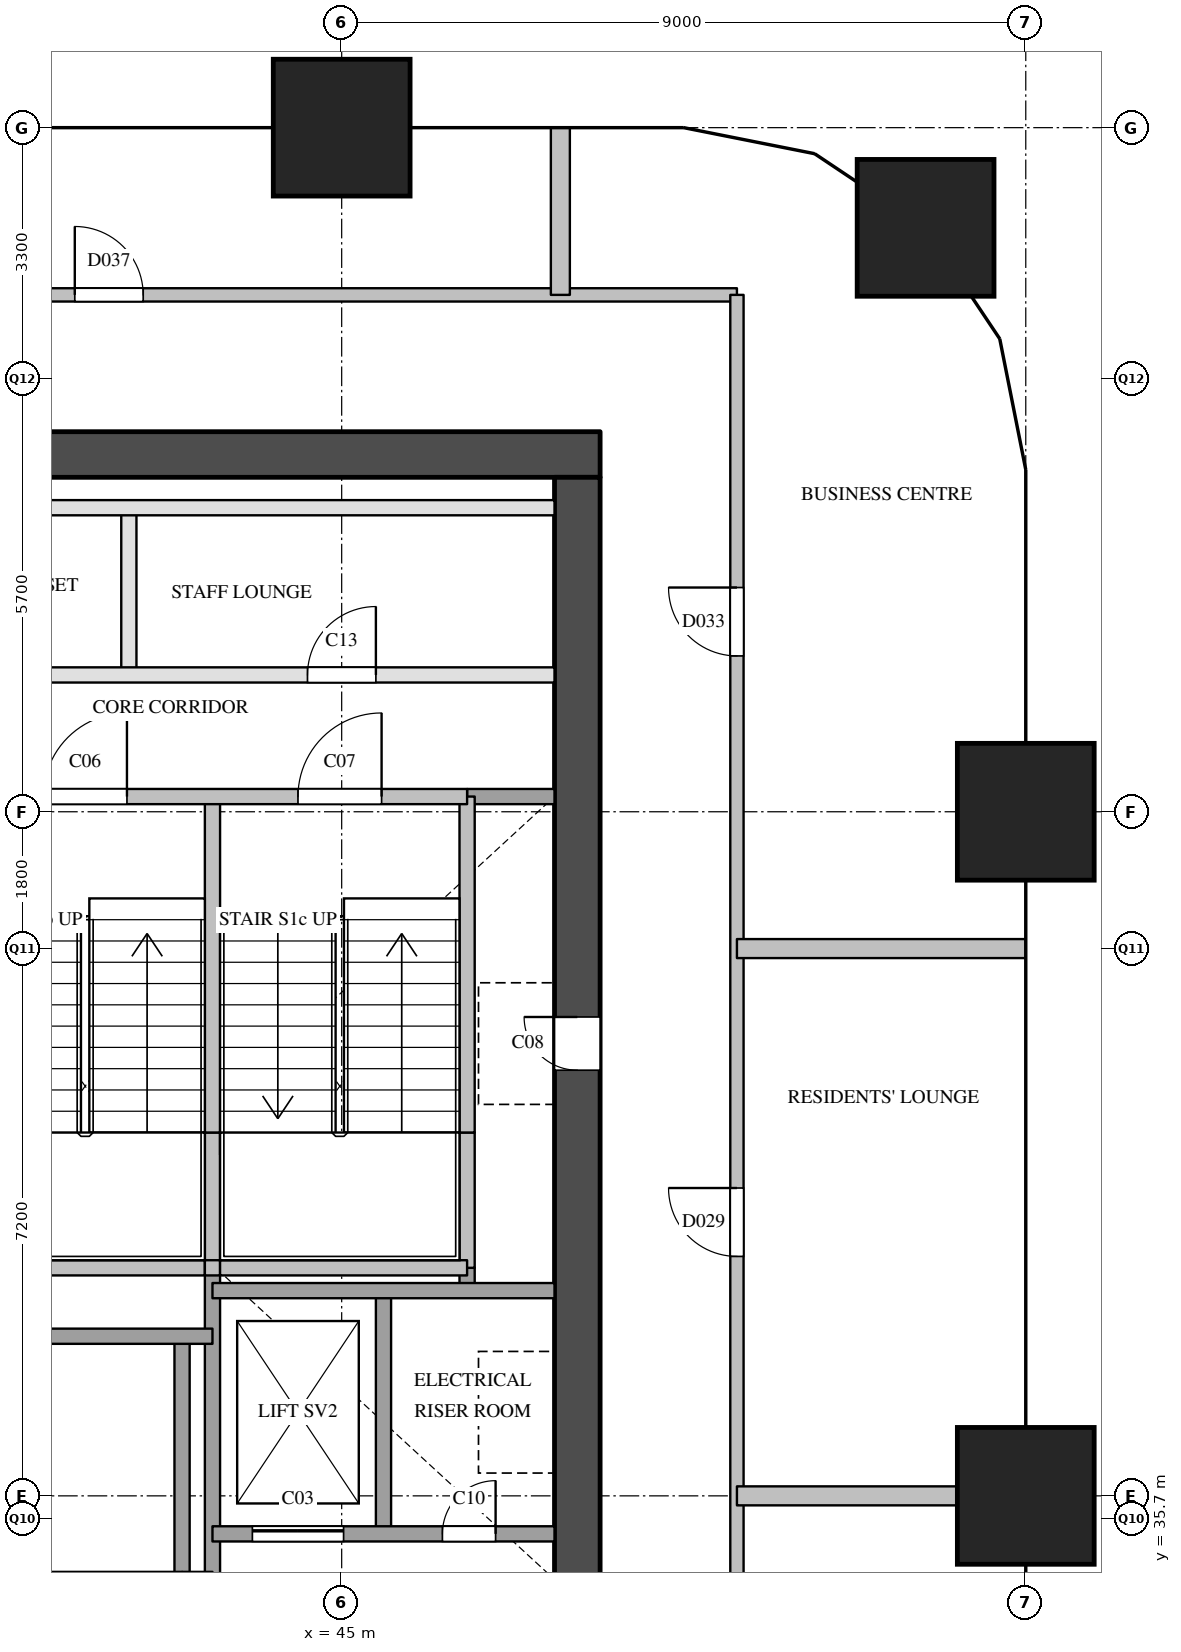
"""IFC4 building model, lengths in metres.
Left out: names, types, materials, properties, quantities, classifications, styles, units other than length and angle.
Written with IfcOpenShell. Run it as: python <this file> out.ifc"""

import sys

from ifc_helpers import new_model, si_unit, direction, frame, frame_2d, origin, origin_2d, place, context, subcontext, project, spatial, rectangle, extrude, element, fill, save


model = new_model("IFC4")
c1 = context("Model", 3, precision=1e-05, world=origin(), true_north=direction((0.0, 1.0)))
c2 = subcontext(c1, "Body", "Model", "MODEL_VIEW")
j1 = project(units=[si_unit("LENGTHUNIT", "METRE"), si_unit("PLANEANGLEUNIT", "RADIAN")], contexts=[c1])
p1 = place(None, origin())
s1 = spatial("IfcSite", under=j1, at=p1, CompositionType="ELEMENT")
p2 = place(p1, origin())
s2 = spatial("IfcBuilding", under=s1, at=p2, CompositionType="ELEMENT")
p3 = place(p2, frame((0.0, 0.0, 112.0)))
s3 = spatial("IfcBuildingStorey", under=s2, at=p3, CompositionType="ELEMENT", Elevation=112.0)
for number, where, z_axis, x_axis in (
    (1, (45.0, 54.0, 0.0), (0.0, 0.0, 1.0), (1.0, 0.0, 0.0)),
    (2, (54.0, 36.0, 0.0), (0.0, 0.0, 1.0), (1.0, 0.0, 0.0)),
    (3, (54.0, 45.0, 0.0), (0.0, 0.0, 1.0), (1.0, 0.0, 0.0)),
    (4, (52.682, 52.682, 0.0), (0.0, 0.0, 1.0), (1.0, 0.0, 0.0)),
):
    element("IfcColumn", number, at=place(p3, frame(where, z_axis=z_axis, x_axis=x_axis)), inside=s3, PredefinedType="COLUMN", context=c2, shape_type="SweptSolid", body=[
        extrude(rectangle(XDim=1.8, YDim=1.8, at=origin_2d()), origin(), (0.0, 0.0, 1.0), 3.8),
    ])
p4 = place(p3, frame((36.0, 49.7, 0.0), z_axis=(0.0, 0.0, 1.0), x_axis=(1.0, 0.0, 0.0)))
e5 = element("IfcWall", 5, at=p4, inside=s3, PredefinedType="SHEAR", context=c2, shape_type="SweptSolid", body=[
    extrude(rectangle(XDim=12.4, YDim=0.6, at=frame_2d((6.2, 0.0))), origin(), (0.0, 0.0, 1.0), 3.5),
])
p5 = place(p3, frame((48.1, 29.1, 0.0), z_axis=(0.0, 0.0, 1.0), x_axis=(0.0, 1.0, 0.0)))
e6 = element("IfcWall", 6, at=p5, inside=s3, PredefinedType="SHEAR", context=c2, shape_type="SweptSolid", body=[
    extrude(rectangle(XDim=20.3, YDim=0.6, at=frame_2d((10.15, 0.0))), origin(), (0.0, 0.0, 1.0), 3.5),
])
p6 = place(p5, frame((12.5, 0.0, 0.0)))
e7 = element("IfcOpeningElement", 7, at=p6, cuts=e6, PredefinedType="OPENING", context=c2, shape_type="SweptSolid", body=[
    extrude(rectangle(XDim=0.7, YDim=2.1, at=frame_2d((0.35, 1.05))), frame((0.0, 0.31, 0.0), z_axis=(0.0, -1.0, 0.0), x_axis=(1.0, 0.0, 0.0)), (0.0, 0.0, 1.0), 0.62),
])
p7 = place(p5, frame((3.9, 0.0, 0.0)))
e8 = element("IfcOpeningElement", 8, at=p7, cuts=e6, PredefinedType="OPENING", context=c2, shape_type="SweptSolid", body=[
    extrude(rectangle(XDim=1.8, YDim=2.1, at=frame_2d((0.9, 1.05))), frame((0.0, 0.31, 0.0), z_axis=(0.0, -1.0, 0.0), x_axis=(1.0, 0.0, 0.0)), (0.0, 0.0, 1.0), 0.62),
])
p8 = place(p3, frame((42.2, 46.8, 0.0), z_axis=(0.0, 0.0, 1.0), x_axis=(0.0, 1.0, 0.0)))
e9 = element("IfcWall", 9, at=p8, inside=s3, PredefinedType="PARTITIONING", context=c2, shape_type="SweptSolid", body=[
    extrude(rectangle(XDim=2.2, YDim=0.2, at=frame_2d((1.1, 0.0))), origin(), (0.0, 0.0, 1.0), 3.5),
])
p9 = place(p3, frame((42.9, 34.9, 0.0), z_axis=(0.0, 0.0, 1.0), x_axis=(0.0, 1.0, 0.0)))
e10 = element("IfcWall", 10, at=p9, inside=s3, PredefinedType="SOLIDWALL", context=c2, shape_type="SweptSolid", body=[
    extrude(rectangle(XDim=3.2, YDim=0.2, at=frame_2d((1.6, 0.0))), origin(), (0.0, 0.0, 1.0), 3.5),
])
p10 = place(p3, frame((43.3, 29.1, 0.0), z_axis=(0.0, 0.0, 1.0), x_axis=(0.0, 1.0, 0.0)))
e11 = element("IfcWall", 11, at=p10, inside=s3, PredefinedType="SOLIDWALL", context=c2, shape_type="SweptSolid", body=[
    extrude(rectangle(XDim=9.9, YDim=0.2, at=frame_2d((4.95, 0.0))), origin(), (0.0, 0.0, 1.0), 3.5),
])
p11 = place(p3, frame((43.3, 39.0, 0.0), z_axis=(0.0, 0.0, 1.0), x_axis=(0.0, 1.0, 0.0)))
e12 = element("IfcWall", 12, at=p11, inside=s3, PredefinedType="SOLIDWALL", context=c2, shape_type="SweptSolid", body=[
    extrude(rectangle(XDim=1.78, YDim=0.2, at=frame_2d((0.89, 0.0))), origin(), (0.0, 0.0, 1.0), 3.5),
])
p12 = place(p3, frame((43.3, 40.78, 0.0), z_axis=(0.0, 0.0, 1.0), x_axis=(0.0, 1.0, 0.0)))
e13 = element("IfcWall", 13, at=p12, inside=s3, PredefinedType="SOLIDWALL", context=c2, shape_type="SweptSolid", body=[
    extrude(rectangle(XDim=4.42, YDim=0.2, at=frame_2d((2.21, 0.0))), origin(), (0.0, 0.0, 1.0), 3.5),
])
p13 = place(p3, frame((45.55, 35.5, 0.0), z_axis=(0.0, 0.0, 1.0), x_axis=(0.0, 1.0, 0.0)))
e14 = element("IfcWall", 14, at=p13, inside=s3, PredefinedType="SOLIDWALL", context=c2, shape_type="SweptSolid", body=[
    extrude(rectangle(XDim=3.2, YDim=0.2, at=frame_2d((1.6, 0.0))), origin(), (0.0, 0.0, 1.0), 3.5),
])
p14 = place(p3, frame((46.65, 38.7, 0.0), z_axis=(0.0, 0.0, 1.0), x_axis=(0.0, 1.0, 0.0)))
e15 = element("IfcWall", 15, at=p14, inside=s3, PredefinedType="SOLIDWALL", context=c2, shape_type="SweptSolid", body=[
    extrude(rectangle(XDim=0.3, YDim=0.2, at=frame_2d((0.15, 0.0))), origin(), (0.0, 0.0, 1.0), 3.5),
])
p15 = place(p3, frame((46.65, 39.0, 0.0), z_axis=(0.0, 0.0, 1.0), x_axis=(0.0, 1.0, 0.0)))
e16 = element("IfcWall", 16, at=p15, inside=s3, PredefinedType="SOLIDWALL", context=c2, shape_type="SweptSolid", body=[
    extrude(rectangle(XDim=1.78, YDim=0.2, at=frame_2d((0.89, 0.0))), origin(), (0.0, 0.0, 1.0), 3.5),
])
p16 = place(p3, frame((46.65, 40.78, 0.0), z_axis=(0.0, 0.0, 1.0), x_axis=(0.0, 1.0, 0.0)))
e17 = element("IfcWall", 17, at=p16, inside=s3, PredefinedType="SOLIDWALL", context=c2, shape_type="SweptSolid", body=[
    extrude(rectangle(XDim=4.42, YDim=0.2, at=frame_2d((2.21, 0.0))), origin(), (0.0, 0.0, 1.0), 3.5),
])
p17 = place(p3, frame((43.3, 35.5, 0.0), z_axis=(0.0, 0.0, 1.0), x_axis=(1.0, 0.0, 0.0)))
e18 = element("IfcWall", 18, at=p17, inside=s3, PredefinedType="SOLIDWALL", context=c2, shape_type="SweptSolid", body=[
    extrude(rectangle(XDim=4.5, YDim=0.2, at=frame_2d((2.25, 0.0))), origin(), (0.0, 0.0, 1.0), 3.5),
])
p18 = place(p17, frame((0.525, 0.0, 0.0)))
e19 = element("IfcOpeningElement", 19, at=p18, cuts=e18, PredefinedType="OPENING", context=c2, shape_type="SweptSolid", body=[
    extrude(rectangle(XDim=1.2, YDim=2.1, at=frame_2d((0.6, 1.05))), frame((0.0, 0.11, 0.0), z_axis=(0.0, -1.0, 0.0), x_axis=(1.0, 0.0, 0.0)), (0.0, 0.0, 1.0), 0.22),
])
p19 = place(p17, frame((3.025, 0.0, 0.0)))
e20 = element("IfcOpeningElement", 20, at=p19, cuts=e18, PredefinedType="OPENING", context=c2, shape_type="SweptSolid", body=[
    extrude(rectangle(XDim=0.7, YDim=2.1, at=frame_2d((0.35, 1.05))), frame((0.0, 0.11, 0.0), z_axis=(0.0, -1.0, 0.0), x_axis=(1.0, 0.0, 0.0)), (0.0, 0.0, 1.0), 0.22),
])
p20 = place(p3, frame((36.6, 38.1, 0.0), z_axis=(0.0, 0.0, 1.0), x_axis=(1.0, 0.0, 0.0)))
e21 = element("IfcWall", 21, at=p20, inside=s3, PredefinedType="SOLIDWALL", context=c2, shape_type="SweptSolid", body=[
    extrude(rectangle(XDim=6.7, YDim=0.2, at=frame_2d((3.35, 0.0))), origin(), (0.0, 0.0, 1.0), 3.5),
])
p21 = place(p3, frame((43.3, 38.7, 0.0), z_axis=(0.0, 0.0, 1.0), x_axis=(1.0, 0.0, 0.0)))
e22 = element("IfcWall", 22, at=p21, inside=s3, PredefinedType="SOLIDWALL", context=c2, shape_type="SweptSolid", body=[
    extrude(rectangle(XDim=4.5, YDim=0.2, at=frame_2d((2.25, 0.0))), origin(), (0.0, 0.0, 1.0), 3.5),
])
p22 = place(p3, frame((40.05, 39.0, 0.0), z_axis=(0.0, 0.0, 1.0), x_axis=(1.0, 0.0, 0.0)))
e23 = element("IfcWall", 23, at=p22, inside=s3, PredefinedType="SOLIDWALL", context=c2, shape_type="SweptSolid", body=[
    extrude(rectangle(XDim=3.15, YDim=0.2, at=frame_2d((1.575, 0.0))), origin(), (0.0, 0.0, 1.0), 3.5),
])
p23 = place(p3, frame((43.2, 39.0, 0.0), z_axis=(0.0, 0.0, 1.0), x_axis=(1.0, 0.0, 0.0)))
e24 = element("IfcWall", 24, at=p23, inside=s3, PredefinedType="SOLIDWALL", context=c2, shape_type="SweptSolid", body=[
    extrude(rectangle(XDim=0.2, YDim=0.2, at=frame_2d((0.1, 0.0))), origin(), (0.0, 0.0, 1.0), 3.5),
])
p24 = place(p3, frame((43.4, 39.0, 0.0), z_axis=(0.0, 0.0, 1.0), x_axis=(1.0, 0.0, 0.0)))
e25 = element("IfcWall", 25, at=p24, inside=s3, PredefinedType="SOLIDWALL", context=c2, shape_type="SweptSolid", body=[
    extrude(rectangle(XDim=3.25, YDim=0.2, at=frame_2d((1.625, 0.0))), origin(), (0.0, 0.0, 1.0), 3.5),
])
p25 = place(p3, frame((46.65, 45.2, 0.0), z_axis=(0.0, 0.0, 1.0), x_axis=(1.0, 0.0, 0.0)))
e26 = element("IfcWall", 26, at=p25, inside=s3, PredefinedType="SOLIDWALL", context=c2, shape_type="SweptSolid", body=[
    extrude(rectangle(XDim=1.15, YDim=0.2, at=frame_2d((0.575, 0.0))), origin(), (0.0, 0.0, 1.0), 3.5),
])
p26 = place(p3, frame((36.6, 45.2, 0.0), z_axis=(0.0, 0.0, 1.0), x_axis=(1.0, 0.0, 0.0)))
e27 = element("IfcWall", 27, at=p26, inside=s3, PredefinedType="SOLIDWALL", context=c2, shape_type="SweptSolid", body=[
    extrude(rectangle(XDim=10.05, YDim=0.2, at=frame_2d((5.025, 0.0))), origin(), (0.0, 0.0, 1.0), 3.5),
])
p27 = place(p26, frame((1.125, 0.0, 0.0)))
e28 = element("IfcOpeningElement", 28, at=p27, cuts=e27, PredefinedType="OPENING", context=c2, shape_type="SweptSolid", body=[
    extrude(rectangle(XDim=1.1, YDim=2.1, at=frame_2d((0.55, 1.05))), frame((0.0, 0.11, 0.0), z_axis=(0.0, -1.0, 0.0), x_axis=(1.0, 0.0, 0.0)), (0.0, 0.0, 1.0), 0.22),
])
p28 = place(p26, frame((4.475, 0.0, 0.0)))
e29 = element("IfcOpeningElement", 29, at=p28, cuts=e27, PredefinedType="OPENING", context=c2, shape_type="SweptSolid", body=[
    extrude(rectangle(XDim=1.1, YDim=2.1, at=frame_2d((0.55, 1.05))), frame((0.0, 0.11, 0.0), z_axis=(0.0, -1.0, 0.0), x_axis=(1.0, 0.0, 0.0)), (0.0, 0.0, 1.0), 0.22),
])
p29 = place(p26, frame((7.825, 0.0, 0.0)))
e30 = element("IfcOpeningElement", 30, at=p29, cuts=e27, PredefinedType="OPENING", context=c2, shape_type="SweptSolid", body=[
    extrude(rectangle(XDim=1.1, YDim=2.1, at=frame_2d((0.55, 1.05))), frame((0.0, 0.11, 0.0), z_axis=(0.0, -1.0, 0.0), x_axis=(1.0, 0.0, 0.0)), (0.0, 0.0, 1.0), 0.22),
])
p30 = place(p3, frame((36.6, 46.8, 0.0), z_axis=(0.0, 0.0, 1.0), x_axis=(1.0, 0.0, 0.0)))
e31 = element("IfcWall", 31, at=p30, inside=s3, PredefinedType="PARTITIONING", context=c2, shape_type="SweptSolid", body=[
    extrude(rectangle(XDim=11.2, YDim=0.2, at=frame_2d((5.6, 0.0))), origin(), (0.0, 0.0, 1.0), 3.5),
])
p31 = place(p30, frame((2.35, 0.0, 0.0)))
e32 = element("IfcOpeningElement", 32, at=p31, cuts=e31, PredefinedType="OPENING", context=c2, shape_type="SweptSolid", body=[
    extrude(rectangle(XDim=0.9, YDim=2.1, at=frame_2d((0.45, 1.05))), frame((0.0, 0.11, 0.0), z_axis=(0.0, -1.0, 0.0), x_axis=(1.0, 0.0, 0.0)), (0.0, 0.0, 1.0), 0.22),
])
p32 = place(p30, frame((7.95, 0.0, 0.0)))
e33 = element("IfcOpeningElement", 33, at=p32, cuts=e31, PredefinedType="OPENING", context=c2, shape_type="SweptSolid", body=[
    extrude(rectangle(XDim=0.9, YDim=2.1, at=frame_2d((0.45, 1.05))), frame((0.0, 0.11, 0.0), z_axis=(0.0, -1.0, 0.0), x_axis=(1.0, 0.0, 0.0)), (0.0, 0.0, 1.0), 0.22),
])
p33 = place(p3, frame((36.6, 49.0, 0.0), z_axis=(0.0, 0.0, 1.0), x_axis=(1.0, 0.0, 0.0)))
e34 = element("IfcWall", 34, at=p33, inside=s3, PredefinedType="PARTITIONING", context=c2, shape_type="SweptSolid", body=[
    extrude(rectangle(XDim=11.2, YDim=0.2, at=frame_2d((5.6, 0.0))), origin(), (0.0, 0.0, 1.0), 3.5),
])
p34 = place(p3, frame((34.2, 51.8, 0.0), z_axis=(0.0, 0.0, 1.0), x_axis=(1.0, 0.0, 0.0)))
e35 = element("IfcWall", 35, at=p34, inside=s3, PredefinedType="PARTITIONING", context=c2, shape_type="SweptSolid", body=[
    extrude(rectangle(XDim=16.0, YDim=0.175, at=frame_2d((8.0, 0.0))), origin(), (0.0, 0.0, 1.0), 3.5),
])
p35 = place(p34, frame((0.45, 0.0, 0.0)))
e36 = element("IfcOpeningElement", 36, at=p35, cuts=e35, PredefinedType="OPENING", context=c2, shape_type="SweptSolid", body=[
    extrude(rectangle(XDim=0.9, YDim=2.1, at=frame_2d((0.45, 1.05))), frame((0.0, 0.097, 0.0), z_axis=(0.0, -1.0, 0.0), x_axis=(1.0, 0.0, 0.0)), (0.0, 0.0, 1.0), 0.195),
])
p36 = place(p34, frame((7.289, 0.0, 0.0)))
e37 = element("IfcOpeningElement", 37, at=p36, cuts=e35, PredefinedType="OPENING", context=c2, shape_type="SweptSolid", body=[
    extrude(rectangle(XDim=0.9, YDim=2.1, at=frame_2d((0.45, 1.05))), frame((0.0, 0.097, 0.0), z_axis=(0.0, -1.0, 0.0), x_axis=(1.0, 0.0, 0.0)), (0.0, 0.0, 1.0), 0.195),
])
p37 = place(p3, frame((50.2, 26.7, 0.0), z_axis=(0.0, 0.0, 1.0), x_axis=(0.0, 1.0, 0.0)))
e38 = element("IfcWall", 38, at=p37, inside=s3, PredefinedType="PARTITIONING", context=c2, shape_type="SweptSolid", body=[
    extrude(rectangle(XDim=25.1, YDim=0.175, at=frame_2d((12.55, 0.0))), origin(), (0.0, 0.0, 1.0), 2.5),
])
p38 = place(p37, frame((4.2, 0.0, 0.0)))
e39 = element("IfcOpeningElement", 39, at=p38, cuts=e38, PredefinedType="OPENING", context=c2, shape_type="SweptSolid", body=[
    extrude(rectangle(XDim=0.9, YDim=2.1, at=frame_2d((0.45, 1.05))), frame((0.0, 0.097, 0.0), z_axis=(0.0, -1.0, 0.0), x_axis=(1.0, 0.0, 0.0)), (0.0, 0.0, 1.0), 0.195),
])
p39 = place(p37, frame((12.45, 0.0, 0.0)))
e40 = element("IfcOpeningElement", 40, at=p39, cuts=e38, PredefinedType="OPENING", context=c2, shape_type="SweptSolid", body=[
    extrude(rectangle(XDim=0.9, YDim=2.1, at=frame_2d((0.45, 1.05))), frame((0.0, 0.097, 0.0), z_axis=(0.0, -1.0, 0.0), x_axis=(1.0, 0.0, 0.0)), (0.0, 0.0, 1.0), 0.195),
])
p40 = place(p37, frame((20.35, 0.0, 0.0)))
e41 = element("IfcOpeningElement", 41, at=p40, cuts=e38, PredefinedType="OPENING", context=c2, shape_type="SweptSolid", body=[
    extrude(rectangle(XDim=0.9, YDim=2.1, at=frame_2d((0.45, 1.05))), frame((0.0, 0.097, 0.0), z_axis=(0.0, -1.0, 0.0), x_axis=(1.0, 0.0, 0.0)), (0.0, 0.0, 1.0), 0.195),
])
p41 = place(p3, frame((50.2, 36.0, 0.0), z_axis=(0.0, 0.0, 1.0), x_axis=(1.0, 0.0, 0.0)))
e42 = element("IfcWall", 42, at=p41, inside=s3, PredefinedType="PARTITIONING", context=c2, shape_type="SweptSolid", body=[
    extrude(rectangle(XDim=3.8, YDim=0.25, at=frame_2d((1.9, 0.0))), origin(), (0.0, 0.0, 1.0), 3.5),
])
p42 = place(p3, frame((50.2, 43.2, 0.0), z_axis=(0.0, 0.0, 1.0), x_axis=(1.0, 0.0, 0.0)))
e43 = element("IfcWall", 43, at=p42, inside=s3, PredefinedType="PARTITIONING", context=c2, shape_type="SweptSolid", body=[
    extrude(rectangle(XDim=3.8, YDim=0.25, at=frame_2d((1.9, 0.0))), origin(), (0.0, 0.0, 1.0), 2.5),
])
p43 = place(p3, frame((47.877, 51.8, 0.0), z_axis=(0.0, 0.0, 1.0), x_axis=(0.0, 1.0, 0.0)))
e44 = element("IfcWall", 44, at=p43, inside=s3, PredefinedType="PARTITIONING", context=c2, shape_type="SweptSolid", body=[
    extrude(rectangle(XDim=2.2, YDim=0.25, at=frame_2d((1.1, 0.0))), origin(), (0.0, 0.0, 1.0), 2.5),
])
p44 = place(p18, origin())
e45 = element("IfcDoor", 45, at=p44, inside=s3, OperationType="SLIDING_TO_LEFT", PredefinedType="DOOR", context=c2, shape_type="SweptSolid", body=[
    extrude(rectangle(XDim=1.2, YDim=2.1, at=frame_2d((0.6, 1.05))), frame((0.0, 0.025, 0.0), z_axis=(0.0, -1.0, 0.0), x_axis=(1.0, 0.0, 0.0)), (0.0, 0.0, 1.0), 0.05),
])
fill(e19, e45)
p45 = place(p28, origin())
e46 = element("IfcDoor", 46, at=p45, inside=s3, OperationType="SINGLE_SWING_RIGHT", PredefinedType="DOOR", context=c2, shape_type="SweptSolid", body=[
    extrude(rectangle(XDim=1.1, YDim=2.1, at=frame_2d((0.55, 1.05))), frame((0.0, 0.025, 0.0), z_axis=(0.0, -1.0, 0.0), x_axis=(1.0, 0.0, 0.0)), (0.0, 0.0, 1.0), 0.05),
])
fill(e29, e46)
p46 = place(p29, origin())
e47 = element("IfcDoor", 47, at=p46, inside=s3, OperationType="SINGLE_SWING_RIGHT", PredefinedType="DOOR", context=c2, shape_type="SweptSolid", body=[
    extrude(rectangle(XDim=1.1, YDim=2.1, at=frame_2d((0.55, 1.05))), frame((0.0, 0.025, 0.0), z_axis=(0.0, -1.0, 0.0), x_axis=(1.0, 0.0, 0.0)), (0.0, 0.0, 1.0), 0.05),
])
fill(e30, e47)
p47 = place(p6, origin())
e48 = element("IfcDoor", 48, at=p47, inside=s3, OperationType="SINGLE_SWING_RIGHT", PredefinedType="DOOR", context=c2, shape_type="SweptSolid", body=[
    extrude(rectangle(XDim=0.7, YDim=2.1, at=frame_2d((0.35, 1.05))), frame((0.0, 0.025, 0.0), z_axis=(0.0, -1.0, 0.0), x_axis=(1.0, 0.0, 0.0)), (0.0, 0.0, 1.0), 0.05),
])
fill(e7, e48)
p48 = place(p19, origin())
e49 = element("IfcDoor", 49, at=p48, inside=s3, OperationType="SINGLE_SWING_RIGHT", PredefinedType="DOOR", context=c2, shape_type="SweptSolid", body=[
    extrude(rectangle(XDim=0.7, YDim=2.1, at=frame_2d((0.35, 1.05))), frame((0.0, 0.025, 0.0), z_axis=(0.0, -1.0, 0.0), x_axis=(1.0, 0.0, 0.0)), (0.0, 0.0, 1.0), 0.05),
])
fill(e20, e49)
p49 = place(p32, origin())
e50 = element("IfcDoor", 50, at=p49, inside=s3, OperationType="SINGLE_SWING_RIGHT", PredefinedType="DOOR", context=c2, shape_type="SweptSolid", body=[
    extrude(rectangle(XDim=0.9, YDim=2.1, at=frame_2d((0.45, 1.05))), frame((0.0, 0.025, 0.0), z_axis=(0.0, -1.0, 0.0), x_axis=(1.0, 0.0, 0.0)), (0.0, 0.0, 1.0), 0.05),
])
fill(e33, e50)
p50 = place(p39, origin())
e51 = element("IfcDoor", 51, at=p50, inside=s3, OperationType="SINGLE_SWING_RIGHT", PredefinedType="DOOR", context=c2, shape_type="SweptSolid", body=[
    extrude(rectangle(XDim=0.9, YDim=2.1, at=frame_2d((0.45, 1.05))), frame((0.0, 0.025, 0.0), z_axis=(0.0, -1.0, 0.0), x_axis=(1.0, 0.0, 0.0)), (0.0, 0.0, 1.0), 0.05),
])
fill(e40, e51)
p51 = place(p40, origin())
e52 = element("IfcDoor", 52, at=p51, inside=s3, OperationType="SINGLE_SWING_RIGHT", PredefinedType="DOOR", context=c2, shape_type="SweptSolid", body=[
    extrude(rectangle(XDim=0.9, YDim=2.1, at=frame_2d((0.45, 1.05))), frame((0.0, 0.025, 0.0), z_axis=(0.0, -1.0, 0.0), x_axis=(1.0, 0.0, 0.0)), (0.0, 0.0, 1.0), 0.05),
])
fill(e41, e52)
p52 = place(p36, origin())
e53 = element("IfcDoor", 53, at=p52, inside=s3, OperationType="SINGLE_SWING_LEFT", PredefinedType="DOOR", context=c2, shape_type="SweptSolid", body=[
    extrude(rectangle(XDim=0.9, YDim=2.1, at=frame_2d((0.45, 1.05))), frame((0.0, 0.025, 0.0), z_axis=(0.0, -1.0, 0.0), x_axis=(1.0, 0.0, 0.0)), (0.0, 0.0, 1.0), 0.05),
])
fill(e37, e53)
save(model, sys.argv[1])
